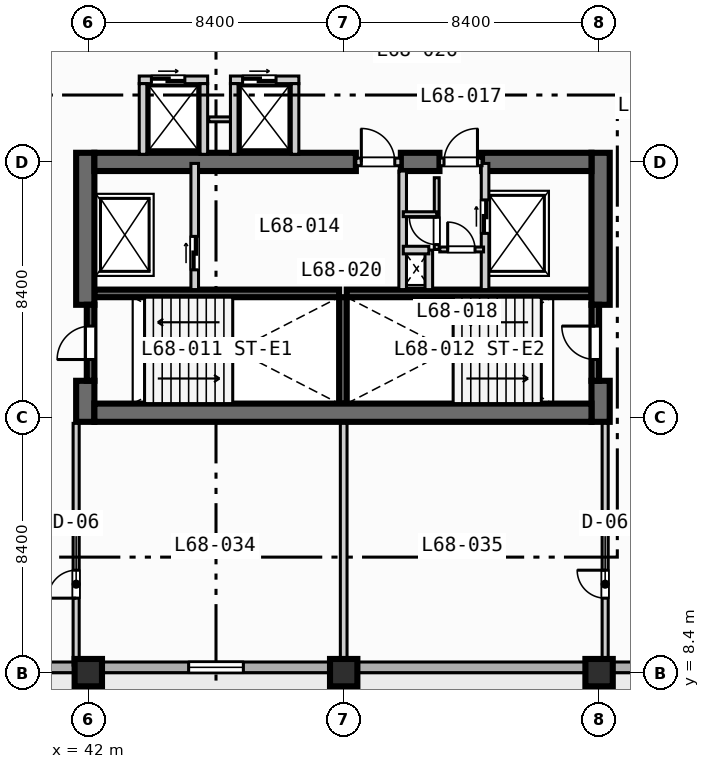
"""IFC4 building model, lengths in metres.
Left out: names, types, materials, properties, quantities, classifications, styles, units other than length and angle.
Written with IfcOpenShell. Run it as: python <this file> out.ifc"""

import sys

from ifc_helpers import new_model, si_unit, direction, frame, frame_2d, origin, origin_2d, place, context, subcontext, project, spatial, rectangle, extrude, element, fill, save


model = new_model("IFC4")
c1 = context("Model", 3, precision=1e-05, world=origin(), true_north=direction((0.0, 1.0)))
c2 = subcontext(c1, "Body", "Model", "MODEL_VIEW")
j1 = project(units=[si_unit("LENGTHUNIT", "METRE"), si_unit("PLANEANGLEUNIT", "RADIAN")], contexts=[c1])
p1 = place(None, origin())
s1 = spatial("IfcSite", under=j1, at=p1, CompositionType="ELEMENT")
p2 = place(p1, origin())
s2 = spatial("IfcBuilding", under=s1, at=p2, CompositionType="ELEMENT")
p3 = place(p2, frame((0.0, 0.0, 274.9)))
s3 = spatial("IfcBuildingStorey", under=s2, at=p3, CompositionType="ELEMENT", Elevation=274.9)
for number, where, z_axis, x_axis in (
    (1, (42.2, 20.875, 0.0), (0.0, 0.0, 1.0), (1.0, 0.0, 0.0)),
    (2, (50.5, 20.875, 0.0), (0.0, 0.0, 1.0), (1.0, 0.0, 0.0)),
):
    element("IfcWall", number, at=place(p3, frame(where, z_axis=z_axis, x_axis=x_axis)), inside=s3, PredefinedType="SOLIDWALL", context=c2, shape_type="SweptSolid", body=[
        extrude(rectangle(XDim=8.05, YDim=0.25, at=frame_2d((4.025, 0.0))), origin(), (0.0, 0.0, 1.0), 3.47),
    ])
p4 = place(p3, frame((50.375, 17.25, 0.0), z_axis=(0.0, 0.0, 1.0), x_axis=(0.0, 1.0, 0.0)))
e3 = element("IfcWall", 3, at=p4, inside=s3, PredefinedType="SOLIDWALL", context=c2, shape_type="SweptSolid", body=[
    extrude(rectangle(XDim=3.5, YDim=0.25, at=frame_2d((1.75, 0.0))), origin(), (0.0, 0.0, 1.0), 3.47),
])
p5 = place(p3, frame((41.9, 16.65, 0.0), z_axis=(0.0, 0.0, 1.0), x_axis=(0.0, 1.0, 0.0)))
e4 = element("IfcWall", 4, at=p5, inside=s3, PredefinedType="SHEAR", context=c2, shape_type="SweptSolid", body=[
    extrude(rectangle(XDim=1.35, YDim=0.6, at=frame_2d((0.675, 0.0))), origin(), (0.0, 0.0, 1.0), 3.47),
])
p6 = place(p3, frame((41.9, 20.5, 0.0), z_axis=(0.0, 0.0, 1.0), x_axis=(0.0, 1.0, 0.0)))
e5 = element("IfcWall", 5, at=p6, inside=s3, PredefinedType="SHEAR", context=c2, shape_type="SweptSolid", body=[
    extrude(rectangle(XDim=5.0, YDim=0.6, at=frame_2d((2.5, 0.0))), origin(), (0.0, 0.0, 1.0), 3.47),
])
p7 = place(p3, frame((58.85, 16.65, 0.0), z_axis=(0.0, 0.0, 1.0), x_axis=(0.0, 1.0, 0.0)))
e6 = element("IfcWall", 6, at=p7, inside=s3, PredefinedType="SHEAR", context=c2, shape_type="SweptSolid", body=[
    extrude(rectangle(XDim=1.35, YDim=0.6, at=frame_2d((0.675, 0.0))), origin(), (0.0, 0.0, 1.0), 3.47),
])
p8 = place(p3, frame((58.85, 20.5, 0.0), z_axis=(0.0, 0.0, 1.0), x_axis=(0.0, 1.0, 0.0)))
e7 = element("IfcWall", 7, at=p8, inside=s3, PredefinedType="SHEAR", context=c2, shape_type="SweptSolid", body=[
    extrude(rectangle(XDim=5.0, YDim=0.6, at=frame_2d((2.5, 0.0))), origin(), (0.0, 0.0, 1.0), 3.47),
])
p9 = place(p3, frame((42.2, 16.95, 0.0), z_axis=(0.0, 0.0, 1.0), x_axis=(1.0, 0.0, 0.0)))
e8 = element("IfcWall", 8, at=p9, inside=s3, PredefinedType="SHEAR", context=c2, shape_type="SweptSolid", body=[
    extrude(rectangle(XDim=16.35, YDim=0.6, at=frame_2d((8.175, 0.0))), origin(), (0.0, 0.0, 1.0), 3.47),
])
p10 = place(p3, frame((42.2, 25.2, 0.0), z_axis=(0.0, 0.0, 1.0), x_axis=(1.0, 0.0, 0.0)))
e9 = element("IfcWall", 9, at=p10, inside=s3, PredefinedType="SHEAR", context=c2, shape_type="SweptSolid", body=[
    extrude(rectangle(XDim=8.6, YDim=0.6, at=frame_2d((4.3, 0.0))), origin(), (0.0, 0.0, 1.0), 3.47),
])
p11 = place(p3, frame((52.28, 25.2, 0.0), z_axis=(0.0, 0.0, 1.0), x_axis=(1.0, 0.0, 0.0)))
e10 = element("IfcWall", 10, at=p11, inside=s3, PredefinedType="SHEAR", context=c2, shape_type="SweptSolid", body=[
    extrude(rectangle(XDim=1.27, YDim=0.6, at=frame_2d((0.635, 0.0))), origin(), (0.0, 0.0, 1.0), 3.47),
])
p12 = place(p3, frame((54.95, 25.2, 0.0), z_axis=(0.0, 0.0, 1.0), x_axis=(1.0, 0.0, 0.0)))
e11 = element("IfcWall", 11, at=p12, inside=s3, PredefinedType="SHEAR", context=c2, shape_type="SweptSolid", body=[
    extrude(rectangle(XDim=3.6, YDim=0.6, at=frame_2d((1.8, 0.0))), origin(), (0.0, 0.0, 1.0), 3.47),
])
for number, where, z_axis, x_axis in (
    (12, (42.0, 8.4, 0.0), (0.0, 0.0, 1.0), (1.0, 0.0, 0.0)),
    (13, (50.4, 8.4, 0.0), (0.0, 0.0, 1.0), (1.0, 0.0, 0.0)),
    (14, (58.8, 8.4, 0.0), (0.0, 0.0, 1.0), (1.0, 0.0, 0.0)),
):
    element("IfcColumn", number, at=place(p3, frame(where, z_axis=z_axis, x_axis=x_axis)), inside=s3, PredefinedType="COLUMN", context=c2, shape_type="SweptSolid", body=[
        extrude(rectangle(XDim=0.9, YDim=0.9, at=origin_2d()), origin(), (0.0, 0.0, 1.0), 3.7),
    ])
p13 = place(p3, frame((72.425, 8.575, 0.0), z_axis=(0.0, 0.0, 1.0), x_axis=(-1.0, 0.0, 0.0)))
e15 = element("IfcWall", 15, at=p13, inside=s3, PredefinedType="STANDARD", context=c2, shape_type="SweptSolid", body=[
    extrude(rectangle(XDim=60.85, YDim=0.35, at=frame_2d((30.425, 0.0))), origin(), (0.0, 0.0, 1.0), 3.47),
])
p14 = place(p13, frame((42.325, 0.0, 0.0)))
e16 = element("IfcOpeningElement", 16, at=p14, cuts=e15, PredefinedType="OPENING", context=c2, shape_type="SweptSolid", body=[
    extrude(rectangle(XDim=1.4, YDim=2.2, at=frame_2d((0.7, 1.1))), frame((0.0, 0.185, 0.0), z_axis=(0.0, -1.0, 0.0), x_axis=(1.0, 0.0, 0.0)), (0.0, 0.0, 1.0), 0.37),
])
p15 = place(p13, frame((33.425, 0.0, 0.85)))
e17 = element("IfcOpeningElement", 17, at=p15, cuts=e15, PredefinedType="OPENING", context=c2, shape_type="SweptSolid", body=[
    extrude(rectangle(XDim=2.4, YDim=1.95, at=frame_2d((1.2, 0.975))), frame((0.0, 0.185, 0.0), z_axis=(0.0, -1.0, 0.0), x_axis=(1.0, 0.0, 0.0)), (0.0, 0.0, 1.0), 0.37),
])
p16 = place(p13, frame((25.325, 0.0, 0.85)))
e18 = element("IfcOpeningElement", 18, at=p16, cuts=e15, PredefinedType="OPENING", context=c2, shape_type="SweptSolid", body=[
    extrude(rectangle(XDim=1.8, YDim=1.8, at=frame_2d((0.9, 0.9))), frame((0.0, 0.185, 0.0), z_axis=(0.0, -1.0, 0.0), x_axis=(1.0, 0.0, 0.0)), (0.0, 0.0, 1.0), 0.37),
])
p17 = place(p13, frame((50.215, 0.0, 0.85)))
e19 = element("IfcOpeningElement", 19, at=p17, cuts=e15, PredefinedType="OPENING", context=c2, shape_type="SweptSolid", body=[
    extrude(rectangle(XDim=1.8, YDim=1.8, at=frame_2d((0.9, 0.9))), frame((0.0, 0.185, 0.0), z_axis=(0.0, -1.0, 0.0), x_axis=(1.0, 0.0, 0.0)), (0.0, 0.0, 1.0), 0.37),
])
p18 = place(p13, frame((57.935, 0.0, 0.85)))
e20 = element("IfcOpeningElement", 20, at=p18, cuts=e15, PredefinedType="OPENING", context=c2, shape_type="SweptSolid", body=[
    extrude(rectangle(XDim=1.8, YDim=1.8, at=frame_2d((0.9, 0.9))), frame((0.0, 0.185, 0.0), z_axis=(0.0, -1.0, 0.0), x_axis=(1.0, 0.0, 0.0)), (0.0, 0.0, 1.0), 0.37),
])
p19 = place(p3, frame((42.075, 18.0, 0.0), z_axis=(0.0, 0.0, 1.0), x_axis=(0.0, 1.0, 0.0)))
e21 = element("IfcWall", 21, at=p19, inside=s3, PredefinedType="SOLIDWALL", context=c2, shape_type="SweptSolid", body=[
    extrude(rectangle(XDim=2.5, YDim=0.25, at=frame_2d((1.25, 0.0))), origin(), (0.0, 0.0, 1.0), 3.47),
])
p20 = place(p19, frame((0.7, 0.0, 0.0)))
e22 = element("IfcOpeningElement", 22, at=p20, cuts=e21, PredefinedType="OPENING", context=c2, shape_type="SweptSolid", body=[
    extrude(rectangle(XDim=1.1, YDim=2.15, at=frame_2d((0.55, 1.075))), frame((0.0, 0.135, 0.0), z_axis=(0.0, -1.0, 0.0), x_axis=(1.0, 0.0, 0.0)), (0.0, 0.0, 1.0), 0.27),
])
p21 = place(p3, frame((58.675, 18.0, 0.0), z_axis=(0.0, 0.0, 1.0), x_axis=(0.0, 1.0, 0.0)))
e23 = element("IfcWall", 23, at=p21, inside=s3, PredefinedType="SOLIDWALL", context=c2, shape_type="SweptSolid", body=[
    extrude(rectangle(XDim=2.5, YDim=0.25, at=frame_2d((1.25, 0.0))), origin(), (0.0, 0.0, 1.0), 3.47),
])
p22 = place(p21, frame((0.7, 0.0, 0.0)))
e24 = element("IfcOpeningElement", 24, at=p22, cuts=e23, PredefinedType="OPENING", context=c2, shape_type="SweptSolid", body=[
    extrude(rectangle(XDim=1.1, YDim=2.15, at=frame_2d((0.55, 1.075))), frame((0.0, 0.135, 0.0), z_axis=(0.0, -1.0, 0.0), x_axis=(1.0, 0.0, 0.0)), (0.0, 0.0, 1.0), 0.27),
])
p23 = place(p3, frame((45.5, 21.0, 0.0), z_axis=(0.0, 0.0, 1.0), x_axis=(0.0, 1.0, 0.0)))
e25 = element("IfcWall", 25, at=p23, inside=s3, PredefinedType="SOLIDWALL", context=c2, shape_type="SweptSolid", body=[
    extrude(rectangle(XDim=4.15, YDim=0.25, at=frame_2d((2.075, 0.0))), origin(), (0.0, 0.0, 1.0), 3.47),
])
p24 = place(p23, frame((0.65, 0.0, 0.0)))
e26 = element("IfcOpeningElement", 26, at=p24, cuts=e25, PredefinedType="OPENING", context=c2, shape_type="SweptSolid", body=[
    extrude(rectangle(XDim=1.1, YDim=2.15, at=frame_2d((0.55, 1.075))), frame((0.0, 0.135, 0.0), z_axis=(0.0, -1.0, 0.0), x_axis=(1.0, 0.0, 0.0)), (0.0, 0.0, 1.0), 0.27),
])
p25 = place(p3, frame((50.8, 25.2, 0.0), z_axis=(0.0, 0.0, 1.0), x_axis=(1.0, 0.0, 0.0)))
e27 = element("IfcWall", 27, at=p25, inside=s3, PredefinedType="SOLIDWALL", context=c2, shape_type="SweptSolid", body=[
    extrude(rectangle(XDim=1.48, YDim=0.25, at=frame_2d((0.74, 0.0))), origin(), (0.0, 0.0, 1.0), 3.47),
])
p26 = place(p25, frame((0.18, 0.0, 0.0)))
e28 = element("IfcOpeningElement", 28, at=p26, cuts=e27, PredefinedType="OPENING", context=c2, shape_type="SweptSolid", body=[
    extrude(rectangle(XDim=1.1, YDim=2.15, at=frame_2d((0.55, 1.075))), frame((0.0, 0.135, 0.0), z_axis=(0.0, -1.0, 0.0), x_axis=(1.0, 0.0, 0.0)), (0.0, 0.0, 1.0), 0.27),
])
p27 = place(p3, frame((52.34, 21.0, 0.0), z_axis=(0.0, 0.0, 1.0), x_axis=(0.0, 1.0, 0.0)))
e29 = element("IfcWall", 29, at=p27, inside=s3, PredefinedType="SOLIDWALL", context=c2, shape_type="SweptSolid", body=[
    extrude(rectangle(XDim=3.9, YDim=0.25, at=frame_2d((1.95, 0.0))), origin(), (0.0, 0.0, 1.0), 3.47),
])
p28 = place(p3, frame((55.05, 21.0, 0.0), z_axis=(0.0, 0.0, 1.0), x_axis=(0.0, 1.0, 0.0)))
e30 = element("IfcWall", 30, at=p28, inside=s3, PredefinedType="SOLIDWALL", context=c2, shape_type="SweptSolid", body=[
    extrude(rectangle(XDim=4.15, YDim=0.25, at=frame_2d((2.075, 0.0))), origin(), (0.0, 0.0, 1.0), 3.47),
])
p29 = place(p28, frame((1.85, 0.0, 0.0)))
e31 = element("IfcOpeningElement", 31, at=p29, cuts=e30, PredefinedType="OPENING", context=c2, shape_type="SweptSolid", body=[
    extrude(rectangle(XDim=1.1, YDim=2.15, at=frame_2d((0.55, 1.075))), frame((0.0, 0.135, 0.0), z_axis=(0.0, -1.0, 0.0), x_axis=(1.0, 0.0, 0.0)), (0.0, 0.0, 1.0), 0.27),
])
p30 = place(p3, frame((53.55, 25.2, 0.0), z_axis=(0.0, 0.0, 1.0), x_axis=(1.0, 0.0, 0.0)))
e32 = element("IfcWall", 32, at=p30, inside=s3, PredefinedType="SOLIDWALL", context=c2, shape_type="SweptSolid", body=[
    extrude(rectangle(XDim=1.4, YDim=0.25, at=frame_2d((0.7, 0.0))), origin(), (0.0, 0.0, 1.0), 3.47),
])
p31 = place(p30, frame((0.15, 0.0, 0.0)))
e33 = element("IfcOpeningElement", 33, at=p31, cuts=e32, PredefinedType="OPENING", context=c2, shape_type="SweptSolid", body=[
    extrude(rectangle(XDim=1.1, YDim=2.15, at=frame_2d((0.55, 1.075))), frame((0.0, 0.135, 0.0), z_axis=(0.0, -1.0, 0.0), x_axis=(1.0, 0.0, 0.0)), (0.0, 0.0, 1.0), 0.27),
])
p32 = place(p3, frame((53.2, 21.0, 0.0), z_axis=(0.0, 0.0, 1.0), x_axis=(0.0, 1.0, 0.0)))
e34 = element("IfcWall", 34, at=p32, inside=s3, PredefinedType="SOLIDWALL", context=c2, shape_type="SweptSolid", body=[
    extrude(rectangle(XDim=1.3, YDim=0.25, at=frame_2d((0.65, 0.0))), origin(), (0.0, 0.0, 1.0), 3.47),
])
p33 = place(p3, frame((52.36, 22.3, 0.0), z_axis=(0.0, 0.0, 1.0), x_axis=(1.0, 0.0, 0.0)))
e35 = element("IfcWall", 35, at=p33, inside=s3, PredefinedType="SOLIDWALL", context=c2, shape_type="SweptSolid", body=[
    extrude(rectangle(XDim=0.84, YDim=0.25, at=frame_2d((0.42, 0.0))), origin(), (0.0, 0.0, 1.0), 3.47),
])
p34 = place(p3, frame((53.56, 22.32, 0.0), z_axis=(0.0, 0.0, 1.0), x_axis=(1.0, 0.0, 0.0)))
e36 = element("IfcWall", 36, at=p34, inside=s3, PredefinedType="PARTITIONING", context=c2, shape_type="SweptSolid", body=[
    extrude(rectangle(XDim=1.44, YDim=0.16, at=frame_2d((0.72, 0.0))), origin(), (0.0, 0.0, 1.0), 3.47),
])
p35 = place(p34, frame((0.26, 0.0, 0.0)))
e37 = element("IfcOpeningElement", 37, at=p35, cuts=e36, PredefinedType="OPENING", context=c2, shape_type="SweptSolid", body=[
    extrude(rectangle(XDim=0.9, YDim=2.1, at=frame_2d((0.45, 1.05))), frame((0.0, 0.09, 0.0), z_axis=(0.0, -1.0, 0.0), x_axis=(1.0, 0.0, 0.0)), (0.0, 0.0, 1.0), 0.18),
])
p36 = place(p3, frame((53.46, 22.32, 0.0), z_axis=(0.0, 0.0, 1.0), x_axis=(0.0, 1.0, 0.0)))
e38 = element("IfcWall", 38, at=p36, inside=s3, PredefinedType="PARTITIONING", context=c2, shape_type="SweptSolid", body=[
    extrude(rectangle(XDim=2.36, YDim=0.16, at=frame_2d((1.18, 0.0))), origin(), (0.0, 0.0, 1.0), 3.47),
])
p37 = place(p36, frame((0.16, 0.0, 0.0)))
e39 = element("IfcOpeningElement", 39, at=p37, cuts=e38, PredefinedType="OPENING", context=c2, shape_type="SweptSolid", body=[
    extrude(rectangle(XDim=0.9, YDim=2.1, at=frame_2d((0.45, 1.05))), frame((0.0, 0.09, 0.0), z_axis=(0.0, -1.0, 0.0), x_axis=(1.0, 0.0, 0.0)), (0.0, 0.0, 1.0), 0.18),
])
p38 = place(p3, frame((52.36, 23.48, 0.0), z_axis=(0.0, 0.0, 1.0), x_axis=(1.0, 0.0, 0.0)))
e40 = element("IfcWall", 40, at=p38, inside=s3, PredefinedType="PARTITIONING", context=c2, shape_type="SweptSolid", body=[
    extrude(rectangle(XDim=1.1, YDim=0.16, at=frame_2d((0.55, 0.0))), origin(), (0.0, 0.0, 1.0), 3.47),
])
p39 = place(p3, frame((43.675, 27.9, 0.0), z_axis=(0.0, 0.0, 1.0), x_axis=(1.0, 0.0, 0.0)))
e41 = element("IfcWall", 41, at=p39, inside=s3, PredefinedType="SOLIDWALL", context=c2, shape_type="SweptSolid", body=[
    extrude(rectangle(XDim=2.25, YDim=0.25, at=frame_2d((1.125, 0.0))), origin(), (0.0, 0.0, 1.0), 3.47),
])
p40 = place(p39, frame((0.4, 0.0, 0.0)))
e42 = element("IfcOpeningElement", 42, at=p40, cuts=e41, PredefinedType="OPENING", context=c2, shape_type="SweptSolid", body=[
    extrude(rectangle(XDim=1.1, YDim=2.15, at=frame_2d((0.55, 1.075))), frame((0.0, 0.135, 0.0), z_axis=(0.0, -1.0, 0.0), x_axis=(1.0, 0.0, 0.0)), (0.0, 0.0, 1.0), 0.27),
])
for number, where, z_axis, x_axis in (
    (43, (43.8, 25.45, 0.0), (0.0, 0.0, 1.0), (0.0, 1.0, 0.0)),
    (44, (45.8, 25.45, 0.0), (0.0, 0.0, 1.0), (0.0, 1.0, 0.0)),
):
    element("IfcWall", number, at=place(p3, frame(where, z_axis=z_axis, x_axis=x_axis)), inside=s3, PredefinedType="SOLIDWALL", context=c2, shape_type="SweptSolid", body=[
        extrude(rectangle(XDim=2.325, YDim=0.25, at=frame_2d((1.163, 0.0))), origin(), (0.0, 0.0, 1.0), 3.47),
    ])
p41 = place(p3, frame((45.96, 26.6, 0.0), z_axis=(0.0, 0.0, 1.0), x_axis=(1.0, 0.0, 0.0)))
e45 = element("IfcWall", 45, at=p41, inside=s3, PredefinedType="PARTITIONING", context=c2, shape_type="SweptSolid", body=[
    extrude(rectangle(XDim=0.88, YDim=0.16, at=frame_2d((0.44, 0.0))), origin(), (0.0, 0.0, 1.0), 3.47),
])
p42 = place(p3, frame((46.675, 27.9, 0.0), z_axis=(0.0, 0.0, 1.0), x_axis=(1.0, 0.0, 0.0)))
e46 = element("IfcWall", 46, at=p42, inside=s3, PredefinedType="SOLIDWALL", context=c2, shape_type="SweptSolid", body=[
    extrude(rectangle(XDim=2.25, YDim=0.25, at=frame_2d((1.125, 0.0))), origin(), (0.0, 0.0, 1.0), 3.47),
])
p43 = place(p42, frame((0.4, 0.0, 0.0)))
e47 = element("IfcOpeningElement", 47, at=p43, cuts=e46, PredefinedType="OPENING", context=c2, shape_type="SweptSolid", body=[
    extrude(rectangle(XDim=1.1, YDim=2.15, at=frame_2d((0.55, 1.075))), frame((0.0, 0.135, 0.0), z_axis=(0.0, -1.0, 0.0), x_axis=(1.0, 0.0, 0.0)), (0.0, 0.0, 1.0), 0.27),
])
for number, where, z_axis, x_axis in (
    (48, (46.8, 25.45, 0.0), (0.0, 0.0, 1.0), (0.0, 1.0, 0.0)),
    (49, (48.8, 25.45, 0.0), (0.0, 0.0, 1.0), (0.0, 1.0, 0.0)),
):
    element("IfcWall", number, at=place(p3, frame(where, z_axis=z_axis, x_axis=x_axis)), inside=s3, PredefinedType="SOLIDWALL", context=c2, shape_type="SweptSolid", body=[
        extrude(rectangle(XDim=2.325, YDim=0.25, at=frame_2d((1.163, 0.0))), origin(), (0.0, 0.0, 1.0), 3.47),
    ])
p44 = place(p3, frame((41.6, 8.65, 0.0), z_axis=(0.0, 0.0, 1.0), x_axis=(0.0, 1.0, 0.0)))
e50 = element("IfcWall", 50, at=p44, inside=s3, PredefinedType="PARTITIONING", context=c2, shape_type="SweptSolid", body=[
    extrude(rectangle(XDim=7.95, YDim=0.2, at=frame_2d((3.975, 0.0))), origin(), (0.0, 0.0, 1.0), 3.47),
])
p45 = place(p44, frame((2.2, 0.0, 0.0)))
e51 = element("IfcOpeningElement", 51, at=p45, cuts=e50, PredefinedType="OPENING", context=c2, shape_type="SweptSolid", body=[
    extrude(rectangle(XDim=0.92, YDim=2.1, at=frame_2d((0.46, 1.05))), frame((0.0, 0.11, 0.0), z_axis=(0.0, -1.0, 0.0), x_axis=(1.0, 0.0, 0.0)), (0.0, 0.0, 1.0), 0.22),
])
p46 = place(p3, frame((59.0, 8.65, 0.0), z_axis=(0.0, 0.0, 1.0), x_axis=(0.0, 1.0, 0.0)))
e52 = element("IfcWall", 52, at=p46, inside=s3, PredefinedType="PARTITIONING", context=c2, shape_type="SweptSolid", body=[
    extrude(rectangle(XDim=7.95, YDim=0.2, at=frame_2d((3.975, 0.0))), origin(), (0.0, 0.0, 1.0), 3.107),
])
p47 = place(p46, frame((2.2, 0.0, 0.0)))
e53 = element("IfcOpeningElement", 53, at=p47, cuts=e52, PredefinedType="OPENING", context=c2, shape_type="SweptSolid", body=[
    extrude(rectangle(XDim=0.92, YDim=2.1, at=frame_2d((0.46, 1.05))), frame((0.0, 0.11, 0.0), z_axis=(0.0, -1.0, 0.0), x_axis=(1.0, 0.0, 0.0)), (0.0, 0.0, 1.0), 0.22),
])
p48 = place(p3, frame((50.4, 8.65, 0.0), z_axis=(0.0, 0.0, 1.0), x_axis=(0.0, 1.0, 0.0)))
e54 = element("IfcWall", 54, at=p48, inside=s3, PredefinedType="PARTITIONING", context=c2, shape_type="SweptSolid", body=[
    extrude(rectangle(XDim=7.95, YDim=0.22, at=frame_2d((3.975, 0.0))), origin(), (0.0, 0.0, 1.0), 2.82),
])
p49 = place(p16, origin())
e55 = element("IfcWindow", 55, at=p49, inside=s3, PartitioningType="SINGLE_PANEL", PredefinedType="WINDOW", context=c2, shape_type="SweptSolid", body=[
    extrude(rectangle(XDim=1.8, YDim=1.8, at=frame_2d((0.9, 0.9))), frame((0.0, 0.03, 0.0), z_axis=(0.0, -1.0, 0.0), x_axis=(1.0, 0.0, 0.0)), (0.0, 0.0, 1.0), 0.06),
])
fill(e18, e55)
p50 = place(p20, origin())
e56 = element("IfcDoor", 56, at=p50, inside=s3, OperationType="SINGLE_SWING_LEFT", PredefinedType="DOOR", context=c2, shape_type="SweptSolid", body=[
    extrude(rectangle(XDim=1.1, YDim=2.15, at=frame_2d((0.55, 1.075))), frame((0.0, 0.025, 0.0), z_axis=(0.0, -1.0, 0.0), x_axis=(1.0, 0.0, 0.0)), (0.0, 0.0, 1.0), 0.05),
])
fill(e22, e56)
p51 = place(p22, origin())
e57 = element("IfcDoor", 57, at=p51, inside=s3, OperationType="SINGLE_SWING_RIGHT", PredefinedType="DOOR", context=c2, shape_type="SweptSolid", body=[
    extrude(rectangle(XDim=1.1, YDim=2.15, at=frame_2d((0.55, 1.075))), frame((0.0, 0.025, 0.0), z_axis=(0.0, -1.0, 0.0), x_axis=(1.0, 0.0, 0.0)), (0.0, 0.0, 1.0), 0.05),
])
fill(e24, e57)
p52 = place(p24, origin())
e58 = element("IfcDoor", 58, at=p52, inside=s3, OperationType="SLIDING_TO_LEFT", PredefinedType="DOOR", context=c2, shape_type="SweptSolid", body=[
    extrude(rectangle(XDim=1.1, YDim=2.15, at=frame_2d((0.55, 1.075))), frame((0.0, 0.025, 0.0), z_axis=(0.0, -1.0, 0.0), x_axis=(1.0, 0.0, 0.0)), (0.0, 0.0, 1.0), 0.05),
])
fill(e26, e58)
p53 = place(p26, origin())
e59 = element("IfcDoor", 59, at=p53, inside=s3, OperationType="SINGLE_SWING_LEFT", PredefinedType="DOOR", context=c2, shape_type="SweptSolid", body=[
    extrude(rectangle(XDim=1.1, YDim=2.15, at=frame_2d((0.55, 1.075))), frame((0.0, 0.025, 0.0), z_axis=(0.0, -1.0, 0.0), x_axis=(1.0, 0.0, 0.0)), (0.0, 0.0, 1.0), 0.05),
])
fill(e28, e59)
p54 = place(p29, origin())
e60 = element("IfcDoor", 60, at=p54, inside=s3, OperationType="SLIDING_TO_LEFT", PredefinedType="DOOR", context=c2, shape_type="SweptSolid", body=[
    extrude(rectangle(XDim=1.1, YDim=2.15, at=frame_2d((0.55, 1.075))), frame((0.0, 0.025, 0.0), z_axis=(0.0, -1.0, 0.0), x_axis=(1.0, 0.0, 0.0)), (0.0, 0.0, 1.0), 0.05),
])
fill(e31, e60)
p55 = place(p31, origin())
e61 = element("IfcDoor", 61, at=p55, inside=s3, OperationType="SINGLE_SWING_RIGHT", PredefinedType="DOOR", context=c2, shape_type="SweptSolid", body=[
    extrude(rectangle(XDim=1.1, YDim=2.15, at=frame_2d((0.55, 1.075))), frame((0.0, 0.025, 0.0), z_axis=(0.0, -1.0, 0.0), x_axis=(1.0, 0.0, 0.0)), (0.0, 0.0, 1.0), 0.05),
])
fill(e33, e61)
p56 = place(p35, origin())
e62 = element("IfcDoor", 62, at=p56, inside=s3, OperationType="SINGLE_SWING_LEFT", PredefinedType="DOOR", context=c2, shape_type="SweptSolid", body=[
    extrude(rectangle(XDim=0.9, YDim=2.1, at=frame_2d((0.45, 1.05))), frame((0.0, 0.025, 0.0), z_axis=(0.0, -1.0, 0.0), x_axis=(1.0, 0.0, 0.0)), (0.0, 0.0, 1.0), 0.05),
])
fill(e37, e62)
p57 = place(p37, origin())
e63 = element("IfcDoor", 63, at=p57, inside=s3, OperationType="SINGLE_SWING_RIGHT", PredefinedType="DOOR", context=c2, shape_type="SweptSolid", body=[
    extrude(rectangle(XDim=0.9, YDim=2.1, at=frame_2d((0.45, 1.05))), frame((0.0, 0.025, 0.0), z_axis=(0.0, -1.0, 0.0), x_axis=(1.0, 0.0, 0.0)), (0.0, 0.0, 1.0), 0.05),
])
fill(e39, e63)
p58 = place(p40, origin())
e64 = element("IfcDoor", 64, at=p58, inside=s3, OperationType="SLIDING_TO_LEFT", PredefinedType="DOOR", context=c2, shape_type="SweptSolid", body=[
    extrude(rectangle(XDim=1.1, YDim=2.15, at=frame_2d((0.55, 1.075))), frame((0.0, 0.025, 0.0), z_axis=(0.0, -1.0, 0.0), x_axis=(1.0, 0.0, 0.0)), (0.0, 0.0, 1.0), 0.05),
])
fill(e42, e64)
p59 = place(p43, origin())
e65 = element("IfcDoor", 65, at=p59, inside=s3, OperationType="SLIDING_TO_LEFT", PredefinedType="DOOR", context=c2, shape_type="SweptSolid", body=[
    extrude(rectangle(XDim=1.1, YDim=2.15, at=frame_2d((0.55, 1.075))), frame((0.0, 0.025, 0.0), z_axis=(0.0, -1.0, 0.0), x_axis=(1.0, 0.0, 0.0)), (0.0, 0.0, 1.0), 0.05),
])
fill(e47, e65)
p60 = place(p45, origin())
e66 = element("IfcDoor", 66, at=p60, inside=s3, OperationType="SINGLE_SWING_LEFT", PredefinedType="DOOR", context=c2, shape_type="SweptSolid", body=[
    extrude(rectangle(XDim=0.92, YDim=2.1, at=frame_2d((0.46, 1.05))), frame((0.0, 0.025, 0.0), z_axis=(0.0, -1.0, 0.0), x_axis=(1.0, 0.0, 0.0)), (0.0, 0.0, 1.0), 0.05),
])
fill(e51, e66)
p61 = place(p47, origin())
e67 = element("IfcDoor", 67, at=p61, inside=s3, OperationType="SINGLE_SWING_RIGHT", PredefinedType="DOOR", context=c2, shape_type="SweptSolid", body=[
    extrude(rectangle(XDim=0.92, YDim=2.1, at=frame_2d((0.46, 1.05))), frame((0.0, 0.025, 0.0), z_axis=(0.0, -1.0, 0.0), x_axis=(1.0, 0.0, 0.0)), (0.0, 0.0, 1.0), 0.05),
])
fill(e53, e67)
save(model, sys.argv[1])
